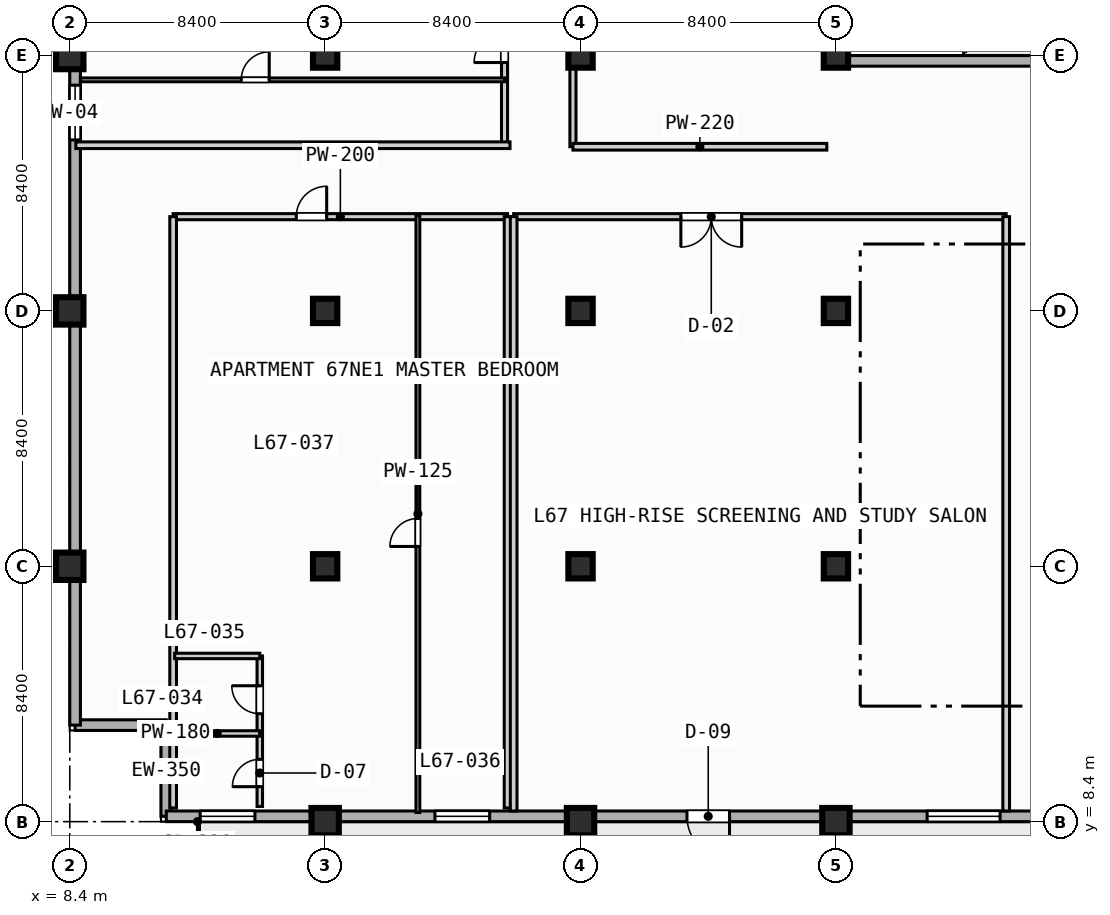
"""IFC4 building model, lengths in metres.
Left out: names, types, materials, properties, quantities, classifications, styles, units other than length and angle.
Written with IfcOpenShell. Run it as: python <this file> out.ifc"""

import sys

from ifc_helpers import new_model, si_unit, direction, frame, frame_2d, origin, origin_2d, place, context, subcontext, project, spatial, rectangle, extrude, element, fill, save


model = new_model("IFC4")
c1 = context("Model", 3, precision=1e-05, world=origin(), true_north=direction((0.0, 1.0)))
c2 = subcontext(c1, "Body", "Model", "MODEL_VIEW")
j1 = project(units=[si_unit("LENGTHUNIT", "METRE"), si_unit("PLANEANGLEUNIT", "RADIAN")], contexts=[c1])
p1 = place(None, origin())
s1 = spatial("IfcSite", under=j1, at=p1, CompositionType="ELEMENT")
p2 = place(p1, origin())
s2 = spatial("IfcBuilding", under=s1, at=p2, CompositionType="ELEMENT")
p3 = place(p2, frame((0.0, 0.0, 271.2)))
s3 = spatial("IfcBuildingStorey", under=s2, at=p3, CompositionType="ELEMENT", Elevation=271.2)
for number, where, z_axis, x_axis in (
    (1, (8.4, 16.8, 0.0), (0.0, 0.0, 1.0), (1.0, 0.0, 0.0)),
    (2, (8.4, 25.2, 0.0), (0.0, 0.0, 1.0), (1.0, 0.0, 0.0)),
    (3, (8.4, 33.6, 0.0), (0.0, 0.0, 1.0), (1.0, 0.0, 0.0)),
    (4, (16.8, 8.4, 0.0), (0.0, 0.0, 1.0), (1.0, 0.0, 0.0)),
):
    element("IfcColumn", number, at=place(p3, frame(where, z_axis=z_axis, x_axis=x_axis)), inside=s3, PredefinedType="COLUMN", context=c2, shape_type="SweptSolid", body=[
        extrude(rectangle(XDim=0.9, YDim=0.9, at=origin_2d()), origin(), (0.0, 0.0, 1.0), 3.7),
    ])
for number, where, z_axis, x_axis in (
    (5, (16.8, 16.8, 0.0), (0.0, 0.0, 1.0), (1.0, 0.0, 0.0)),
    (6, (16.8, 25.2, 0.0), (0.0, 0.0, 1.0), (1.0, 0.0, 0.0)),
    (7, (16.8, 33.6, 0.0), (0.0, 0.0, 1.0), (1.0, 0.0, 0.0)),
):
    element("IfcColumn", number, at=place(p3, frame(where, z_axis=z_axis, x_axis=x_axis)), inside=s3, PredefinedType="COLUMN", context=c2, shape_type="SweptSolid", body=[
        extrude(rectangle(XDim=0.8, YDim=0.8, at=origin_2d()), origin(), (0.0, 0.0, 1.0), 3.7),
    ])
p4 = place(p3, frame((25.2, 8.4, 0.0), z_axis=(0.0, 0.0, 1.0), x_axis=(1.0, 0.0, 0.0)))
e8 = element("IfcColumn", 8, at=p4, inside=s3, PredefinedType="COLUMN", context=c2, shape_type="SweptSolid", body=[
    extrude(rectangle(XDim=0.9, YDim=0.9, at=origin_2d()), origin(), (0.0, 0.0, 1.0), 3.7),
])
for number, where, z_axis, x_axis in (
    (9, (25.2, 16.8, 0.0), (0.0, 0.0, 1.0), (1.0, 0.0, 0.0)),
    (10, (25.2, 25.2, 0.0), (0.0, 0.0, 1.0), (1.0, 0.0, 0.0)),
    (11, (25.2, 33.6, 0.0), (0.0, 0.0, 1.0), (1.0, 0.0, 0.0)),
):
    element("IfcColumn", number, at=place(p3, frame(where, z_axis=z_axis, x_axis=x_axis)), inside=s3, PredefinedType="COLUMN", context=c2, shape_type="SweptSolid", body=[
        extrude(rectangle(XDim=0.8, YDim=0.8, at=origin_2d()), origin(), (0.0, 0.0, 1.0), 3.7),
    ])
p5 = place(p3, frame((33.6, 8.4, 0.0), z_axis=(0.0, 0.0, 1.0), x_axis=(1.0, 0.0, 0.0)))
e12 = element("IfcColumn", 12, at=p5, inside=s3, PredefinedType="COLUMN", context=c2, shape_type="SweptSolid", body=[
    extrude(rectangle(XDim=0.9, YDim=0.9, at=origin_2d()), origin(), (0.0, 0.0, 1.0), 3.7),
])
for number, where, z_axis, x_axis in (
    (13, (33.6, 16.8, 0.0), (0.0, 0.0, 1.0), (1.0, 0.0, 0.0)),
    (14, (33.6, 25.2, 0.0), (0.0, 0.0, 1.0), (1.0, 0.0, 0.0)),
    (15, (33.6, 33.6, 0.0), (0.0, 0.0, 1.0), (1.0, 0.0, 0.0)),
):
    element("IfcColumn", number, at=place(p3, frame(where, z_axis=z_axis, x_axis=x_axis)), inside=s3, PredefinedType="COLUMN", context=c2, shape_type="SweptSolid", body=[
        extrude(rectangle(XDim=0.8, YDim=0.8, at=origin_2d()), origin(), (0.0, 0.0, 1.0), 3.7),
    ])
for number, where, z_axis, x_axis in (
    (16, (11.575, 8.575, 0.0), (0.0, 0.0, 1.0), (0.0, 1.0, 0.0)),
    (17, (11.575, 11.575, 0.0), (0.0, 0.0, 1.0), (-1.0, 0.0, 0.0)),
):
    element("IfcWall", number, at=place(p3, frame(where, z_axis=z_axis, x_axis=x_axis)), inside=s3, PredefinedType="STANDARD", context=c2, shape_type="SweptSolid", body=[
        extrude(rectangle(XDim=3.0, YDim=0.35, at=frame_2d((1.5, 0.0))), origin(), (0.0, 0.0, 1.0), 3.47),
    ])
p6 = place(p3, frame((8.575, 11.575, 0.0), z_axis=(0.0, 0.0, 1.0), x_axis=(0.0, 1.0, 0.0)))
e18 = element("IfcWall", 18, at=p6, inside=s3, PredefinedType="STANDARD", context=c2, shape_type="SweptSolid", body=[
    extrude(rectangle(XDim=60.85, YDim=0.35, at=frame_2d((30.425, 0.0))), origin(), (0.0, 0.0, 1.0), 3.47),
])
p7 = place(p6, frame((33.925, 0.0, 0.0)))
e19 = element("IfcOpeningElement", 19, at=p7, cuts=e18, PredefinedType="OPENING", context=c2, shape_type="SweptSolid", body=[
    extrude(rectangle(XDim=1.4, YDim=2.2, at=frame_2d((0.7, 1.1))), frame((0.0, 0.185, 0.0), z_axis=(0.0, -1.0, 0.0), x_axis=(1.0, 0.0, 0.0)), (0.0, 0.0, 1.0), 0.37),
])
p8 = place(p6, frame((25.025, 0.0, 0.85)))
e20 = element("IfcOpeningElement", 20, at=p8, cuts=e18, PredefinedType="OPENING", context=c2, shape_type="SweptSolid", body=[
    extrude(rectangle(XDim=2.4, YDim=1.95, at=frame_2d((1.2, 0.975))), frame((0.0, 0.185, 0.0), z_axis=(0.0, -1.0, 0.0), x_axis=(1.0, 0.0, 0.0)), (0.0, 0.0, 1.0), 0.37),
])
p9 = place(p6, frame((41.825, 0.0, 0.85)))
e21 = element("IfcOpeningElement", 21, at=p9, cuts=e18, PredefinedType="OPENING", context=c2, shape_type="SweptSolid", body=[
    extrude(rectangle(XDim=2.4, YDim=1.95, at=frame_2d((1.2, 0.975))), frame((0.0, 0.185, 0.0), z_axis=(0.0, -1.0, 0.0), x_axis=(1.0, 0.0, 0.0)), (0.0, 0.0, 1.0), 0.37),
])
p10 = place(p6, frame((19.25, 0.0, 0.85)))
e22 = element("IfcOpeningElement", 22, at=p10, cuts=e18, PredefinedType="OPENING", context=c2, shape_type="SweptSolid", body=[
    extrude(rectangle(XDim=1.8, YDim=1.8, at=frame_2d((0.9, 0.9))), frame((0.0, 0.185, 0.0), z_axis=(0.0, -1.0, 0.0), x_axis=(1.0, 0.0, 0.0)), (0.0, 0.0, 1.0), 0.37),
])
p11 = place(p3, frame((33.425, 72.425, 0.0), z_axis=(0.0, 0.0, 1.0), x_axis=(0.0, -1.0, 0.0)))
e23 = element("IfcWall", 23, at=p11, inside=s3, PredefinedType="STANDARD", context=c2, shape_type="SweptSolid", body=[
    extrude(rectangle(XDim=39.0, YDim=0.35, at=frame_2d((19.5, 0.0))), origin(), (0.0, 0.0, 1.0), 3.47),
])
p12 = place(p11, frame((33.725, 0.0, 0.85)))
e24 = element("IfcOpeningElement", 24, at=p12, cuts=e23, PredefinedType="OPENING", context=c2, shape_type="SweptSolid", body=[
    extrude(rectangle(XDim=1.8, YDim=1.8, at=frame_2d((0.9, 0.9))), frame((0.0, 0.185, 0.0), z_axis=(0.0, -1.0, 0.0), x_axis=(1.0, 0.0, 0.0)), (0.0, 0.0, 1.0), 0.37),
])
p13 = place(p11, frame((8.225, 0.0, 0.85)))
e25 = element("IfcOpeningElement", 25, at=p13, cuts=e23, PredefinedType="OPENING", context=c2, shape_type="SweptSolid", body=[
    extrude(rectangle(XDim=2.4, YDim=1.95, at=frame_2d((1.2, 0.975))), frame((0.0, 0.185, 0.0), z_axis=(0.0, -1.0, 0.0), x_axis=(1.0, 0.0, 0.0)), (0.0, 0.0, 1.0), 0.37),
])
p14 = place(p3, frame((33.425, 33.425, 0.0), z_axis=(0.0, 0.0, 1.0), x_axis=(1.0, 0.0, 0.0)))
e26 = element("IfcWall", 26, at=p14, inside=s3, PredefinedType="STANDARD", context=c2, shape_type="SweptSolid", body=[
    extrude(rectangle(XDim=39.0, YDim=0.35, at=frame_2d((19.5, 0.0))), origin(), (0.0, 0.0, 1.0), 3.47),
])
p15 = place(p14, frame((12.075, 0.0, 0.0)))
e27 = element("IfcOpeningElement", 27, at=p15, cuts=e26, PredefinedType="OPENING", context=c2, shape_type="SweptSolid", body=[
    extrude(rectangle(XDim=1.4, YDim=2.2, at=frame_2d((0.7, 1.1))), frame((0.0, 0.185, 0.0), z_axis=(0.0, -1.0, 0.0), x_axis=(1.0, 0.0, 0.0)), (0.0, 0.0, 1.0), 0.37),
])
p16 = place(p3, frame((72.425, 8.575, 0.0), z_axis=(0.0, 0.0, 1.0), x_axis=(-1.0, 0.0, 0.0)))
e28 = element("IfcWall", 28, at=p16, inside=s3, PredefinedType="STANDARD", context=c2, shape_type="SweptSolid", body=[
    extrude(rectangle(XDim=60.85, YDim=0.35, at=frame_2d((30.425, 0.0))), origin(), (0.0, 0.0, 1.0), 3.47),
])
p17 = place(p16, frame((42.325, 0.0, 0.0)))
e29 = element("IfcOpeningElement", 29, at=p17, cuts=e28, PredefinedType="OPENING", context=c2, shape_type="SweptSolid", body=[
    extrude(rectangle(XDim=1.4, YDim=2.2, at=frame_2d((0.7, 1.1))), frame((0.0, 0.185, 0.0), z_axis=(0.0, -1.0, 0.0), x_axis=(1.0, 0.0, 0.0)), (0.0, 0.0, 1.0), 0.37),
])
p18 = place(p16, frame((33.425, 0.0, 0.85)))
e30 = element("IfcOpeningElement", 30, at=p18, cuts=e28, PredefinedType="OPENING", context=c2, shape_type="SweptSolid", body=[
    extrude(rectangle(XDim=2.4, YDim=1.95, at=frame_2d((1.2, 0.975))), frame((0.0, 0.185, 0.0), z_axis=(0.0, -1.0, 0.0), x_axis=(1.0, 0.0, 0.0)), (0.0, 0.0, 1.0), 0.37),
])
p19 = place(p16, frame((25.325, 0.0, 0.85)))
e31 = element("IfcOpeningElement", 31, at=p19, cuts=e28, PredefinedType="OPENING", context=c2, shape_type="SweptSolid", body=[
    extrude(rectangle(XDim=1.8, YDim=1.8, at=frame_2d((0.9, 0.9))), frame((0.0, 0.185, 0.0), z_axis=(0.0, -1.0, 0.0), x_axis=(1.0, 0.0, 0.0)), (0.0, 0.0, 1.0), 0.37),
])
p20 = place(p16, frame((50.215, 0.0, 0.85)))
e32 = element("IfcOpeningElement", 32, at=p20, cuts=e28, PredefinedType="OPENING", context=c2, shape_type="SweptSolid", body=[
    extrude(rectangle(XDim=1.8, YDim=1.8, at=frame_2d((0.9, 0.9))), frame((0.0, 0.185, 0.0), z_axis=(0.0, -1.0, 0.0), x_axis=(1.0, 0.0, 0.0)), (0.0, 0.0, 1.0), 0.37),
])
p21 = place(p16, frame((57.935, 0.0, 0.85)))
e33 = element("IfcOpeningElement", 33, at=p21, cuts=e28, PredefinedType="OPENING", context=c2, shape_type="SweptSolid", body=[
    extrude(rectangle(XDim=1.8, YDim=1.8, at=frame_2d((0.9, 0.9))), frame((0.0, 0.185, 0.0), z_axis=(0.0, -1.0, 0.0), x_axis=(1.0, 0.0, 0.0)), (0.0, 0.0, 1.0), 0.37),
])
p22 = place(p3, frame((24.95, 30.6, 0.0), z_axis=(0.0, 0.0, 1.0), x_axis=(0.0, 1.0, 0.0)))
e34 = element("IfcWall", 34, at=p22, inside=s3, PredefinedType="PARTITIONING", context=c2, shape_type="SweptSolid", body=[
    extrude(rectangle(XDim=8.8, YDim=0.2, at=frame_2d((4.4, 0.0))), origin(), (0.0, 0.0, 1.0), 2.82),
])
p23 = place(p22, frame((3.75, 0.0, 0.0)))
e35 = element("IfcOpeningElement", 35, at=p23, cuts=e34, PredefinedType="OPENING", context=c2, shape_type="SweptSolid", body=[
    extrude(rectangle(XDim=0.92, YDim=2.1, at=frame_2d((0.46, 1.05))), frame((0.0, 0.11, 0.0), z_axis=(0.0, -1.0, 0.0), x_axis=(1.0, 0.0, 0.0)), (0.0, 0.0, 1.0), 0.22),
])
p24 = place(p3, frame((24.95, 30.6, 0.0), z_axis=(0.0, 0.0, 1.0), x_axis=(1.0, 0.0, 0.0)))
e36 = element("IfcWall", 36, at=p24, inside=s3, PredefinedType="PARTITIONING", context=c2, shape_type="SweptSolid", body=[
    extrude(rectangle(XDim=8.35, YDim=0.22, at=frame_2d((4.175, 0.0))), origin(), (0.0, 0.0, 1.0), 3.47),
])
p25 = place(p3, frame((11.8, 28.3, 0.0), z_axis=(0.0, 0.0, 1.0), x_axis=(1.0, 0.0, 0.0)))
e37 = element("IfcWall", 37, at=p25, inside=s3, PredefinedType="PARTITIONING", context=c2, shape_type="SweptSolid", body=[
    extrude(rectangle(XDim=11.0, YDim=0.2, at=frame_2d((5.5, 0.0))), origin(), (0.0, 0.0, 1.0), 3.47),
])
p26 = place(p25, frame((4.05, 0.0, 0.0)))
e38 = element("IfcOpeningElement", 38, at=p26, cuts=e37, PredefinedType="OPENING", context=c2, shape_type="SweptSolid", body=[
    extrude(rectangle(XDim=1.0, YDim=2.15, at=frame_2d((0.5, 1.075))), frame((0.0, 0.11, 0.0), z_axis=(0.0, -1.0, 0.0), x_axis=(1.0, 0.0, 0.0)), (0.0, 0.0, 1.0), 0.22),
])
for number, where, z_axis, x_axis in (
    (39, (22.8, 8.85, 0.0), (0.0, 0.0, 1.0), (0.0, 1.0, 0.0)),
    (40, (11.8, 8.85, 0.0), (0.0, 0.0, 1.0), (0.0, 1.0, 0.0)),
):
    element("IfcWall", number, at=place(p3, frame(where, z_axis=z_axis, x_axis=x_axis)), inside=s3, PredefinedType="PARTITIONING", context=c2, shape_type="SweptSolid", body=[
        extrude(rectangle(XDim=19.45, YDim=0.22, at=frame_2d((9.725, 0.0))), origin(), (0.0, 0.0, 1.0), 3.47),
    ])
p27 = place(p3, frame((14.65, 8.9, 0.0), z_axis=(0.0, 0.0, 1.0), x_axis=(0.0, 1.0, 0.0)))
e41 = element("IfcWall", 41, at=p27, inside=s3, PredefinedType="PLUMBINGWALL", context=c2, shape_type="SweptSolid", body=[
    extrude(rectangle(XDim=4.95, YDim=0.18, at=frame_2d((2.475, 0.0))), origin(), (0.0, 0.0, 1.0), 3.47),
])
p28 = place(p27, frame((0.65, 0.0, 0.0)))
e42 = element("IfcOpeningElement", 42, at=p28, cuts=e41, PredefinedType="OPENING", context=c2, shape_type="SweptSolid", body=[
    extrude(rectangle(XDim=0.9, YDim=2.1, at=frame_2d((0.45, 1.05))), frame((0.0, 0.1, 0.0), z_axis=(0.0, -1.0, 0.0), x_axis=(1.0, 0.0, 0.0)), (0.0, 0.0, 1.0), 0.2),
])
p29 = place(p27, frame((3.05, 0.0, 0.0)))
e43 = element("IfcOpeningElement", 43, at=p29, cuts=e41, PredefinedType="OPENING", context=c2, shape_type="SweptSolid", body=[
    extrude(rectangle(XDim=0.92, YDim=2.1, at=frame_2d((0.46, 1.05))), frame((0.0, 0.1, 0.0), z_axis=(0.0, -1.0, 0.0), x_axis=(1.0, 0.0, 0.0)), (0.0, 0.0, 1.0), 0.2),
])
for number, where, z_axis, x_axis in (
    (44, (11.85, 11.3, 0.0), (0.0, 0.0, 1.0), (1.0, 0.0, 0.0)),
    (45, (11.85, 13.85, 0.0), (0.0, 0.0, 1.0), (1.0, 0.0, 0.0)),
):
    element("IfcWall", number, at=place(p3, frame(where, z_axis=z_axis, x_axis=x_axis)), inside=s3, PredefinedType="PLUMBINGWALL", context=c2, shape_type="SweptSolid", body=[
        extrude(rectangle(XDim=2.8, YDim=0.18, at=frame_2d((1.4, 0.0))), origin(), (0.0, 0.0, 1.0), 3.47),
    ])
p30 = place(p3, frame((19.85, 8.7, 0.0), z_axis=(0.0, 0.0, 1.0), x_axis=(0.0, 1.0, 0.0)))
e46 = element("IfcWall", 46, at=p30, inside=s3, PredefinedType="PARTITIONING", context=c2, shape_type="SweptSolid", body=[
    extrude(rectangle(XDim=19.65, YDim=0.125, at=frame_2d((9.825, 0.0))), origin(), (0.0, 0.0, 1.0), 3.47),
])
p31 = place(p30, frame((8.752, 0.0, 0.0)))
e47 = element("IfcOpeningElement", 47, at=p31, cuts=e46, PredefinedType="OPENING", context=c2, shape_type="SweptSolid", body=[
    extrude(rectangle(XDim=0.92, YDim=2.1, at=frame_2d((0.46, 1.05))), frame((0.0, 0.073, 0.0), z_axis=(0.0, -1.0, 0.0), x_axis=(1.0, 0.0, 0.0)), (0.0, 0.0, 1.0), 0.145),
])
p32 = place(p3, frame((23.0, 28.3, 0.0), z_axis=(0.0, 0.0, 1.0), x_axis=(1.0, 0.0, 0.0)))
e48 = element("IfcWall", 48, at=p32, inside=s3, PredefinedType="PARTITIONING", context=c2, shape_type="SweptSolid", body=[
    extrude(rectangle(XDim=16.2, YDim=0.2, at=frame_2d((8.1, 0.0))), origin(), (0.0, 0.0, 1.0), 3.47),
])
p33 = place(p32, frame((5.5, 0.0, 0.0)))
e49 = element("IfcOpeningElement", 49, at=p33, cuts=e48, PredefinedType="OPENING", context=c2, shape_type="SweptSolid", body=[
    extrude(rectangle(XDim=2.0, YDim=2.15, at=frame_2d((1.0, 1.075))), frame((0.0, 0.11, 0.0), z_axis=(0.0, -1.0, 0.0), x_axis=(1.0, 0.0, 0.0)), (0.0, 0.0, 1.0), 0.22),
])
for number, where, z_axis, x_axis in (
    (50, (23.0, 8.75, 0.0), (0.0, 0.0, 1.0), (0.0, 1.0, 0.0)),
    (51, (39.2, 8.75, 0.0), (0.0, 0.0, 1.0), (0.0, 1.0, 0.0)),
):
    element("IfcWall", number, at=place(p3, frame(where, z_axis=z_axis, x_axis=x_axis)), inside=s3, PredefinedType="PARTITIONING", context=c2, shape_type="SweptSolid", body=[
        extrude(rectangle(XDim=19.55, YDim=0.22, at=frame_2d((9.775, 0.0))), origin(), (0.0, 0.0, 1.0), 3.47),
    ])
p34 = place(p3, frame((22.7, 30.65, 0.0), z_axis=(0.0, 0.0, 1.0), x_axis=(0.0, 1.0, 0.0)))
e52 = element("IfcWall", 52, at=p34, inside=s3, PredefinedType="PARTITIONING", context=c2, shape_type="SweptSolid", body=[
    extrude(rectangle(XDim=8.75, YDim=0.2, at=frame_2d((4.375, 0.0))), origin(), (0.0, 0.0, 1.0), 3.47),
])
p35 = place(p34, frame((2.72, 0.0, 0.0)))
e53 = element("IfcOpeningElement", 53, at=p35, cuts=e52, PredefinedType="OPENING", context=c2, shape_type="SweptSolid", body=[
    extrude(rectangle(XDim=1.0, YDim=2.15, at=frame_2d((0.5, 1.075))), frame((0.0, 0.11, 0.0), z_axis=(0.0, -1.0, 0.0), x_axis=(1.0, 0.0, 0.0)), (0.0, 0.0, 1.0), 0.22),
])
p36 = place(p3, frame((8.6, 30.65, 0.0), z_axis=(0.0, 0.0, 1.0), x_axis=(1.0, 0.0, 0.0)))
e54 = element("IfcWall", 54, at=p36, inside=s3, PredefinedType="PARTITIONING", context=c2, shape_type="SweptSolid", body=[
    extrude(rectangle(XDim=14.28, YDim=0.22, at=frame_2d((7.14, 0.0))), origin(), (0.0, 0.0, 1.0), 3.47),
])
p37 = place(p3, frame((8.75, 32.8, 0.0), z_axis=(0.0, 0.0, 1.0), x_axis=(1.0, 0.0, 0.0)))
e55 = element("IfcWall", 55, at=p37, inside=s3, PredefinedType="PARTITIONING", context=c2, shape_type="SweptSolid", body=[
    extrude(rectangle(XDim=13.95, YDim=0.125, at=frame_2d((6.975, 0.0))), origin(), (0.0, 0.0, 1.0), 3.47),
])
p38 = place(p37, frame((5.29, 0.0, 0.0)))
e56 = element("IfcOpeningElement", 56, at=p38, cuts=e55, PredefinedType="OPENING", context=c2, shape_type="SweptSolid", body=[
    extrude(rectangle(XDim=0.92, YDim=2.1, at=frame_2d((0.46, 1.05))), frame((0.0, 0.073, 0.0), z_axis=(0.0, -1.0, 0.0), x_axis=(1.0, 0.0, 0.0)), (0.0, 0.0, 1.0), 0.145),
])
p39 = place(p10, origin())
e57 = element("IfcWindow", 57, at=p39, inside=s3, PartitioningType="SINGLE_PANEL", PredefinedType="WINDOW", context=c2, shape_type="SweptSolid", body=[
    extrude(rectangle(XDim=1.8, YDim=1.8, at=frame_2d((0.9, 0.9))), frame((0.0, 0.03, 0.0), z_axis=(0.0, -1.0, 0.0), x_axis=(1.0, 0.0, 0.0)), (0.0, 0.0, 1.0), 0.06),
])
fill(e22, e57)
p40 = place(p17, origin())
e58 = element("IfcDoor", 58, at=p40, inside=s3, OperationType="SINGLE_SWING_LEFT", PredefinedType="DOOR", context=c2, shape_type="SweptSolid", body=[
    extrude(rectangle(XDim=1.4, YDim=2.2, at=frame_2d((0.7, 1.1))), frame((0.0, 0.025, 0.0), z_axis=(0.0, -1.0, 0.0), x_axis=(1.0, 0.0, 0.0)), (0.0, 0.0, 1.0), 0.05),
])
fill(e29, e58)
p41 = place(p18, origin())
e59 = element("IfcWindow", 59, at=p41, inside=s3, PartitioningType="SINGLE_PANEL", PredefinedType="WINDOW", context=c2, shape_type="SweptSolid", body=[
    extrude(rectangle(XDim=2.4, YDim=1.95, at=frame_2d((1.2, 0.975))), frame((0.0, 0.03, 0.0), z_axis=(0.0, -1.0, 0.0), x_axis=(1.0, 0.0, 0.0)), (0.0, 0.0, 1.0), 0.06),
])
fill(e30, e59)
p42 = place(p20, origin())
e60 = element("IfcWindow", 60, at=p42, inside=s3, PartitioningType="SINGLE_PANEL", PredefinedType="WINDOW", context=c2, shape_type="SweptSolid", body=[
    extrude(rectangle(XDim=1.8, YDim=1.8, at=frame_2d((0.9, 0.9))), frame((0.0, 0.03, 0.0), z_axis=(0.0, -1.0, 0.0), x_axis=(1.0, 0.0, 0.0)), (0.0, 0.0, 1.0), 0.06),
])
fill(e32, e60)
p43 = place(p21, origin())
e61 = element("IfcWindow", 61, at=p43, inside=s3, PartitioningType="SINGLE_PANEL", PredefinedType="WINDOW", context=c2, shape_type="SweptSolid", body=[
    extrude(rectangle(XDim=1.8, YDim=1.8, at=frame_2d((0.9, 0.9))), frame((0.0, 0.03, 0.0), z_axis=(0.0, -1.0, 0.0), x_axis=(1.0, 0.0, 0.0)), (0.0, 0.0, 1.0), 0.06),
])
fill(e33, e61)
p44 = place(p26, origin())
e62 = element("IfcDoor", 62, at=p44, inside=s3, OperationType="SINGLE_SWING_RIGHT", PredefinedType="DOOR", context=c2, shape_type="SweptSolid", body=[
    extrude(rectangle(XDim=1.0, YDim=2.15, at=frame_2d((0.5, 1.075))), frame((0.0, 0.025, 0.0), z_axis=(0.0, -1.0, 0.0), x_axis=(1.0, 0.0, 0.0)), (0.0, 0.0, 1.0), 0.05),
])
fill(e38, e62)
p45 = place(p28, origin())
e63 = element("IfcDoor", 63, at=p45, inside=s3, OperationType="SINGLE_SWING_LEFT", PredefinedType="DOOR", context=c2, shape_type="SweptSolid", body=[
    extrude(rectangle(XDim=0.9, YDim=2.1, at=frame_2d((0.45, 1.05))), frame((0.0, 0.025, 0.0), z_axis=(0.0, -1.0, 0.0), x_axis=(1.0, 0.0, 0.0)), (0.0, 0.0, 1.0), 0.05),
])
fill(e42, e63)
p46 = place(p29, origin())
e64 = element("IfcDoor", 64, at=p46, inside=s3, OperationType="SINGLE_SWING_RIGHT", PredefinedType="DOOR", context=c2, shape_type="SweptSolid", body=[
    extrude(rectangle(XDim=0.92, YDim=2.1, at=frame_2d((0.46, 1.05))), frame((0.0, 0.025, 0.0), z_axis=(0.0, -1.0, 0.0), x_axis=(1.0, 0.0, 0.0)), (0.0, 0.0, 1.0), 0.05),
])
fill(e43, e64)
p47 = place(p31, origin())
e65 = element("IfcDoor", 65, at=p47, inside=s3, OperationType="SINGLE_SWING_LEFT", PredefinedType="DOOR", context=c2, shape_type="SweptSolid", body=[
    extrude(rectangle(XDim=0.92, YDim=2.1, at=frame_2d((0.46, 1.05))), frame((0.0, 0.025, 0.0), z_axis=(0.0, -1.0, 0.0), x_axis=(1.0, 0.0, 0.0)), (0.0, 0.0, 1.0), 0.05),
])
fill(e47, e65)
p48 = place(p33, origin())
e66 = element("IfcDoor", 66, at=p48, inside=s3, OperationType="SINGLE_SWING_RIGHT", PredefinedType="DOOR", context=c2, shape_type="SweptSolid", body=[
    extrude(rectangle(XDim=2.0, YDim=2.15, at=frame_2d((1.0, 1.075))), frame((0.0, 0.025, 0.0), z_axis=(0.0, -1.0, 0.0), x_axis=(1.0, 0.0, 0.0)), (0.0, 0.0, 1.0), 0.05),
])
fill(e49, e66)
p49 = place(p35, origin())
e67 = element("IfcDoor", 67, at=p49, inside=s3, OperationType="SINGLE_SWING_LEFT", PredefinedType="DOOR", context=c2, shape_type="SweptSolid", body=[
    extrude(rectangle(XDim=1.0, YDim=2.15, at=frame_2d((0.5, 1.075))), frame((0.0, 0.025, 0.0), z_axis=(0.0, -1.0, 0.0), x_axis=(1.0, 0.0, 0.0)), (0.0, 0.0, 1.0), 0.05),
])
fill(e53, e67)
p50 = place(p38, origin())
e68 = element("IfcDoor", 68, at=p50, inside=s3, OperationType="SINGLE_SWING_RIGHT", PredefinedType="DOOR", context=c2, shape_type="SweptSolid", body=[
    extrude(rectangle(XDim=0.92, YDim=2.1, at=frame_2d((0.46, 1.05))), frame((0.0, 0.025, 0.0), z_axis=(0.0, -1.0, 0.0), x_axis=(1.0, 0.0, 0.0)), (0.0, 0.0, 1.0), 0.05),
])
fill(e56, e68)
save(model, sys.argv[1])
